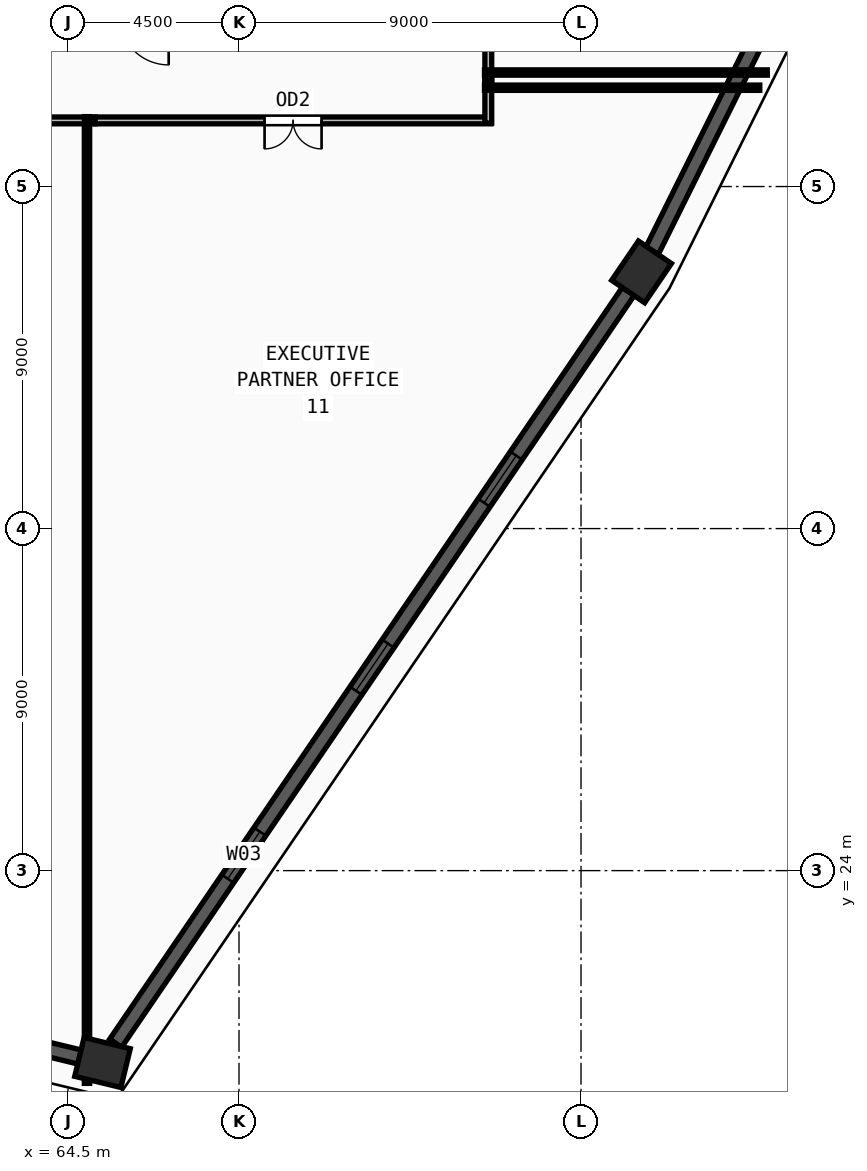
"""IFC4 building model, lengths in metres.
Left out: names, types, materials, properties, quantities, classifications, styles, units other than length and angle.
Written with IfcOpenShell. Run it as: python <this file> out.ifc"""

import sys

from ifc_helpers import new_model, si_unit, direction, frame, frame_2d, origin, origin_2d, place, context, subcontext, project, spatial, rectangle, extrude, source, transform, mapped, element, fill, save


model = new_model("IFC4")
c1 = context("Model", 3, precision=1e-05, world=origin(), true_north=direction((0.0, 1.0)))
c2 = subcontext(c1, "Body", "Model", "MODEL_VIEW")
j1 = project(units=[si_unit("LENGTHUNIT", "METRE"), si_unit("PLANEANGLEUNIT", "RADIAN")], contexts=[c1])
p1 = place(None, origin())
s1 = spatial("IfcSite", under=j1, at=p1, CompositionType="ELEMENT")
p2 = place(p1, origin())
s2 = spatial("IfcBuilding", under=s1, at=p2, CompositionType="ELEMENT")
p3 = place(p2, frame((0.0, 0.0, 224.25)))
s3 = spatial("IfcBuildingStorey", under=s2, at=p3, CompositionType="ELEMENT", Elevation=224.25)
m1 = source(origin(), c2, "Body", "SweptSolid", [
    extrude(rectangle(XDim=1.25, YDim=1.05, at=origin_2d()), origin(), (0.0, 0.0, 1.0), 3.75),
])
for number, where, z_axis, x_axis in (
    (1, (79.593, 39.754, 0.0), (0.0, 0.0, 1.0), (0.563, 0.826, 0.0)),
    (2, (65.408, 18.951, 0.0), (0.0, 0.0, 1.0), (-0.972, 0.235, 0.0)),
):
    element("IfcColumn", number, at=place(p3, frame(where, z_axis=z_axis, x_axis=x_axis)), inside=s3, PredefinedType="COLUMN", context=c2, shape_type="MappedRepresentation", body=[
        mapped(m1, transform((0.0, 0.0, 0.0), x_axis=(1.0, 0.0, 0.0), y_axis=(0.0, 1.0, 0.0), z_axis=(0.0, 0.0, 1.0), scale=1.0)),
    ])
p4 = place(p3, frame((60.598, 20.113, 0.0), z_axis=(0.0, 0.0, 1.0), x_axis=(0.972011709717, -0.234932407669, 0.0)))
e3 = element("IfcWall", 3, at=p4, inside=s3, PredefinedType="SOLIDWALL", context=c2, shape_type="SweptSolid", body=[
    extrude(rectangle(XDim=4.333, YDim=0.38, at=frame_2d((2.167, 0.0))), origin(), (0.0, 0.0, 1.0), 3.57),
])
m2 = source(origin(), c2, "Body", "SweptSolid", [
    extrude(rectangle(XDim=1.2, YDim=1.9, at=frame_2d((0.6, 0.95))), frame((0.0, 0.2, 0.0), z_axis=(0.0, -1.0, 0.0), x_axis=(1.0, 0.0, 0.0)), (0.0, 0.0, 1.0), 0.4),
])
p5 = place(p4, frame((1.567, 0.0, 0.55)))
e4 = element("IfcOpeningElement", 4, at=p5, cuts=e3, PredefinedType="OPENING", context=c2, shape_type="MappedRepresentation", body=[
    mapped(m2, transform((0.0, 0.0, 0.0), x_axis=(1.0, 0.0, 0.0), y_axis=(0.0, 1.0, 0.0), z_axis=(0.0, 0.0, 1.0), scale=1.0)),
])
p6 = place(p3, frame((65.754, 19.459, 0.0), z_axis=(0.0, 0.0, 1.0), x_axis=(0.563392494029, 0.826189383659, 0.0)))
e5 = element("IfcWall", 5, at=p6, inside=s3, PredefinedType="SOLIDWALL", context=c2, shape_type="SweptSolid", body=[
    extrude(rectangle(XDim=23.95, YDim=0.38, at=frame_2d((11.975, 0.0))), origin(), (0.0, 0.0, 1.0), 3.57),
])
m3 = source(origin(), c2, "Body", "SweptSolid", [
    extrude(rectangle(XDim=1.5, YDim=1.9, at=frame_2d((0.75, 0.95))), frame((0.0, 0.2, 0.0), z_axis=(0.0, -1.0, 0.0), x_axis=(1.0, 0.0, 0.0)), (0.0, 0.0, 1.0), 0.4),
])
p7 = place(p6, frame((5.237, 0.0, 0.55)))
e6 = element("IfcOpeningElement", 6, at=p7, cuts=e5, PredefinedType="OPENING", context=c2, shape_type="MappedRepresentation", body=[
    mapped(m3, transform((0.0, 0.0, 0.0), x_axis=(1.0, 0.0, 0.0), y_axis=(0.0, 1.0, 0.0), z_axis=(0.0, 0.0, 1.0), scale=1.0)),
])
p8 = place(p6, frame((11.225, 0.0, 0.55)))
e7 = element("IfcOpeningElement", 7, at=p8, cuts=e5, PredefinedType="OPENING", context=c2, shape_type="MappedRepresentation", body=[
    mapped(m3, transform((0.0, 0.0, 0.0), x_axis=(1.0, 0.0, 0.0), y_axis=(0.0, 1.0, 0.0), z_axis=(0.0, 0.0, 1.0), scale=1.0)),
])
p9 = place(p6, frame((17.212, 0.0, 0.55)))
e8 = element("IfcOpeningElement", 8, at=p9, cuts=e5, PredefinedType="OPENING", context=c2, shape_type="MappedRepresentation", body=[
    mapped(m3, transform((0.0, 0.0, 0.0), x_axis=(1.0, 0.0, 0.0), y_axis=(0.0, 1.0, 0.0), z_axis=(0.0, 0.0, 1.0), scale=1.0)),
])
p10 = place(p3, frame((79.867, 40.305, 0.0), z_axis=(0.0, 0.0, 1.0), x_axis=(0.444873284972, 0.895593524049, 0.0)))
e9 = element("IfcWall", 9, at=p10, inside=s3, PredefinedType="SOLIDWALL", context=c2, shape_type="SweptSolid", body=[
    extrude(rectangle(XDim=29.02, YDim=0.38, at=frame_2d((14.51, 0.0))), origin(), (0.0, 0.0, 1.0), 3.57),
])
p11 = place(p10, frame((6.505, 0.0, 0.55)))
e10 = element("IfcOpeningElement", 10, at=p11, cuts=e9, PredefinedType="OPENING", context=c2, shape_type="MappedRepresentation", body=[
    mapped(m3, transform((0.0, 0.0, 0.0), x_axis=(1.0, 0.0, 0.0), y_axis=(0.0, 1.0, 0.0), z_axis=(0.0, 0.0, 1.0), scale=1.0)),
])
p12 = place(p10, frame((13.76, 0.0, 0.55)))
e11 = element("IfcOpeningElement", 11, at=p12, cuts=e9, PredefinedType="OPENING", context=c2, shape_type="MappedRepresentation", body=[
    mapped(m3, transform((0.0, 0.0, 0.0), x_axis=(1.0, 0.0, 0.0), y_axis=(0.0, 1.0, 0.0), z_axis=(0.0, 0.0, 1.0), scale=1.0)),
])
p13 = place(p10, frame((21.015, 0.0, 0.55)))
e12 = element("IfcOpeningElement", 12, at=p13, cuts=e9, PredefinedType="OPENING", context=c2, shape_type="MappedRepresentation", body=[
    mapped(m3, transform((0.0, 0.0, 0.0), x_axis=(1.0, 0.0, 0.0), y_axis=(0.0, 1.0, 0.0), z_axis=(0.0, 0.0, 1.0), scale=1.0)),
])
p14 = place(p3, frame((65.215, 43.74, 0.0), z_axis=(0.0, 0.0, 1.0), x_axis=(-1.0, 0.0, 0.0)))
e13 = element("IfcWall", 13, at=p14, inside=s3, PredefinedType="PARTITIONING", context=c2, shape_type="SweptSolid", body=[
    extrude(rectangle(XDim=20.845, YDim=0.18, at=frame_2d((10.422, 0.0))), origin(), (0.0, 0.0, 1.0), 3.57),
])
m4 = source(origin(), c2, "Body", "SweptSolid", [
    extrude(rectangle(XDim=1.5, YDim=2.2, at=frame_2d((0.75, 1.1))), frame((0.0, 0.1, 0.0), z_axis=(0.0, -1.0, 0.0), x_axis=(1.0, 0.0, 0.0)), (0.0, 0.0, 1.0), 0.2),
])
p15 = place(p14, frame((9.673, 0.0, 0.0)))
e14 = element("IfcOpeningElement", 14, at=p15, cuts=e13, PredefinedType="OPENING", context=c2, shape_type="MappedRepresentation", body=[
    mapped(m4, transform((0.0, 0.0, 0.0), x_axis=(1.0, 0.0, 0.0), y_axis=(0.0, 1.0, 0.0), z_axis=(0.0, 0.0, 1.0), scale=1.0)),
])
p16 = place(p3, frame((75.63, 43.74, 0.0), z_axis=(0.0, 0.0, 1.0), x_axis=(-1.0, 0.0, 0.0)))
e15 = element("IfcWall", 15, at=p16, inside=s3, PredefinedType="PARTITIONING", context=c2, shape_type="SweptSolid", body=[
    extrude(rectangle(XDim=10.415, YDim=0.18, at=frame_2d((5.208, 0.0))), origin(), (0.0, 0.0, 1.0), 3.57),
])
p17 = place(p16, frame((4.457, 0.0, 0.0)))
e16 = element("IfcOpeningElement", 16, at=p17, cuts=e15, PredefinedType="OPENING", context=c2, shape_type="MappedRepresentation", body=[
    mapped(m4, transform((0.0, 0.0, 0.0), x_axis=(1.0, 0.0, 0.0), y_axis=(0.0, 1.0, 0.0), z_axis=(0.0, 0.0, 1.0), scale=1.0)),
])
p18 = place(p3, frame((75.56, 51.285, 0.0), z_axis=(0.0, 0.0, 1.0), x_axis=(0.0, -1.0, 0.0)))
e17 = element("IfcWall", 17, at=p18, inside=s3, PredefinedType="PARTITIONING", context=c2, shape_type="SweptSolid", body=[
    extrude(rectangle(XDim=6.5, YDim=0.18, at=frame_2d((3.25, 0.0))), origin(), (0.0, 0.0, 1.0), 3.57),
])
m5 = source(origin(), c2, "Body", "SweptSolid", [
    extrude(rectangle(XDim=1.0, YDim=2.2, at=frame_2d((0.5, 1.1))), frame((0.0, 0.1, 0.0), z_axis=(0.0, -1.0, 0.0), x_axis=(1.0, 0.0, 0.0)), (0.0, 0.0, 1.0), 0.2),
])
p19 = place(p18, frame((2.75, 0.0, 0.0)))
e18 = element("IfcOpeningElement", 18, at=p19, cuts=e17, PredefinedType="OPENING", context=c2, shape_type="MappedRepresentation", body=[
    mapped(m5, transform((0.0, 0.0, 0.0), x_axis=(1.0, 0.0, 0.0), y_axis=(0.0, 1.0, 0.0), z_axis=(0.0, 0.0, 1.0), scale=1.0)),
])
p20 = place(p3, frame((75.56, 44.785, 0.0), z_axis=(0.0, 0.0, 1.0), x_axis=(0.0, -1.0, 0.0)))
e19 = element("IfcWall", 19, at=p20, inside=s3, PredefinedType="PARTITIONING", context=c2, shape_type="SweptSolid", body=[
    extrude(rectangle(XDim=1.115, YDim=0.18, at=frame_2d((0.558, 0.0))), origin(), (0.0, 0.0, 1.0), 3.57),
])
p21 = place(p3, frame((75.46, 44.6, 0.0), z_axis=(0.0, 0.0, 1.0), x_axis=(1.0, 0.0, 0.0)))
e20 = element("IfcWall", 20, at=p21, inside=s3, PredefinedType="PARTITIONING", context=c2, shape_type="SweptSolid", body=[
    extrude(rectangle(XDim=7.244, YDim=0.14, at=frame_2d((3.622, 0.0))), origin(), (0.0, 0.0, 1.0), 3.57),
])
p22 = place(p3, frame((75.46, 45.0, 0.0), z_axis=(0.0, 0.0, 1.0), x_axis=(1.0, 0.0, 0.0)))
e21 = element("IfcWall", 21, at=p22, inside=s3, PredefinedType="PARTITIONING", context=c2, shape_type="SweptSolid", body=[
    extrude(rectangle(XDim=7.442, YDim=0.14, at=frame_2d((3.721, 0.0))), origin(), (0.0, 0.0, 1.0), 3.57),
])
p23 = place(p3, frame((65.0, 43.84, 0.0), z_axis=(0.0, 0.0, 1.0), x_axis=(0.0, -1.0, 0.0)))
e22 = element("IfcWall", 22, at=p23, inside=s3, PredefinedType="PARTITIONING", context=c2, shape_type="SweptSolid", body=[
    extrude(rectangle(XDim=25.438, YDim=0.14, at=frame_2d((12.719, 0.0))), origin(), (0.0, 0.0, 1.0), 3.57),
])
m6 = source(origin(), c2, "Body", "SweptSolid", [
    extrude(rectangle(XDim=1.5, YDim=1.9, at=frame_2d((0.75, 0.95))), frame((0.0, 0.03, 0.0), z_axis=(0.0, -1.0, 0.0), x_axis=(1.0, 0.0, 0.0)), (0.0, 0.0, 1.0), 0.06),
])
p24 = place(p7, origin())
e23 = element("IfcWindow", 23, at=p24, inside=s3, PartitioningType="DOUBLE_PANEL_VERTICAL", PredefinedType="WINDOW", context=c2, shape_type="MappedRepresentation", body=[
    mapped(m6, transform((0.0, 0.0, 0.0), x_axis=(1.0, 0.0, 0.0), y_axis=(0.0, 1.0, 0.0), z_axis=(0.0, 0.0, 1.0), scale=1.0)),
])
fill(e6, e23)
p25 = place(p8, origin())
e24 = element("IfcWindow", 24, at=p25, inside=s3, PartitioningType="DOUBLE_PANEL_VERTICAL", PredefinedType="WINDOW", context=c2, shape_type="MappedRepresentation", body=[
    mapped(m6, transform((0.0, 0.0, 0.0), x_axis=(1.0, 0.0, 0.0), y_axis=(0.0, 1.0, 0.0), z_axis=(0.0, 0.0, 1.0), scale=1.0)),
])
fill(e7, e24)
p26 = place(p9, origin())
e25 = element("IfcWindow", 25, at=p26, inside=s3, PartitioningType="DOUBLE_PANEL_VERTICAL", PredefinedType="WINDOW", context=c2, shape_type="MappedRepresentation", body=[
    mapped(m6, transform((0.0, 0.0, 0.0), x_axis=(1.0, 0.0, 0.0), y_axis=(0.0, 1.0, 0.0), z_axis=(0.0, 0.0, 1.0), scale=1.0)),
])
fill(e8, e25)
m7 = source(origin(), c2, "Body", "SweptSolid", [
    extrude(rectangle(XDim=1.5, YDim=2.2, at=frame_2d((0.75, 1.1))), frame((0.0, 0.025, 0.0), z_axis=(0.0, -1.0, 0.0), x_axis=(1.0, 0.0, 0.0)), (0.0, 0.0, 1.0), 0.05),
])
p27 = place(p17, origin())
e26 = element("IfcDoor", 26, at=p27, inside=s3, OperationType="DOUBLE_DOOR_SINGLE_SWING", PredefinedType="DOOR", context=c2, shape_type="MappedRepresentation", body=[
    mapped(m7, transform((0.0, 0.0, 0.0), x_axis=(1.0, 0.0, 0.0), y_axis=(0.0, 1.0, 0.0), z_axis=(0.0, 0.0, 1.0), scale=1.0)),
])
fill(e16, e26)
save(model, sys.argv[1])
